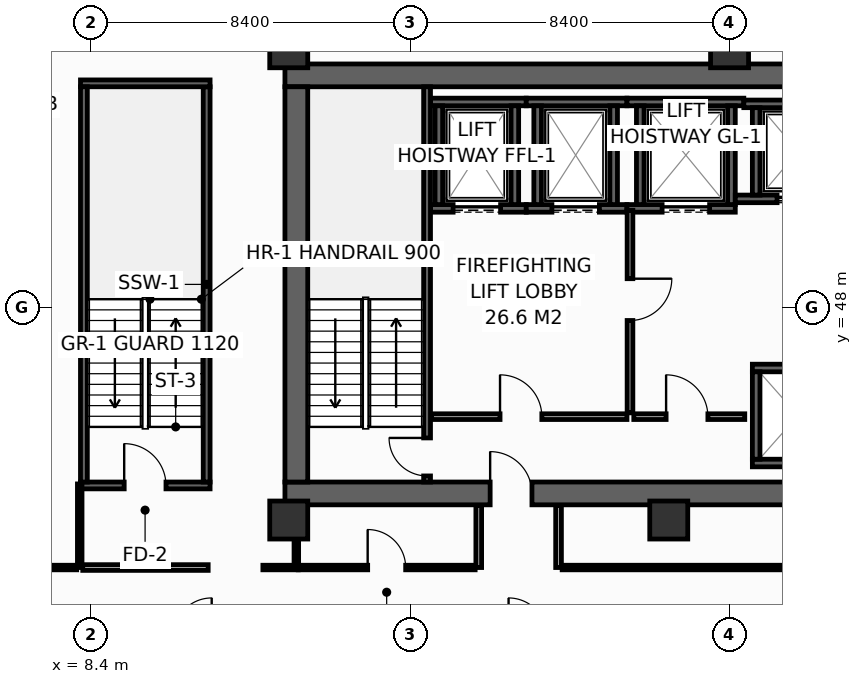
"""IFC4 building model, lengths in metres.
Left out: names, types, materials, properties, quantities, classifications, styles, units other than length and angle.
Written with IfcOpenShell. Run it as: python <this file> out.ifc"""

import sys

from ifc_helpers import new_model, si_unit, direction, frame, frame_2d, origin, origin_2d, place, context, subcontext, project, spatial, rectangle, hollow_rectangle, extrude, element, fill, save


model = new_model("IFC4")
c1 = context("Model", 3, precision=1e-05, world=origin(), true_north=direction((0.0, 1.0)))
c2 = subcontext(c1, "Body", "Model", "MODEL_VIEW")
j1 = project(units=[si_unit("LENGTHUNIT", "METRE"), si_unit("PLANEANGLEUNIT", "RADIAN")], contexts=[c1])
p1 = place(None, origin())
s1 = spatial("IfcSite", under=j1, at=p1, CompositionType="ELEMENT")
p2 = place(p1, origin())
s2 = spatial("IfcBuilding", under=s1, at=p2, CompositionType="ELEMENT")
p3 = place(p2, frame((0.0, 0.0, 101.6)))
s3 = spatial("IfcBuildingStorey", under=s2, at=p3, CompositionType="ELEMENT", Elevation=101.6)
p4 = place(p3, frame((13.5, 43.1, 0.0), z_axis=(0.0, 0.0, 1.0), x_axis=(1.0, 0.0, 0.0)))
e1 = element("IfcWall", 1, at=p4, inside=s3, PredefinedType="SHEAR", context=c2, shape_type="SweptSolid", body=[
    extrude(rectangle(XDim=32.9, YDim=0.6, at=frame_2d((16.45, 0.0))), origin(), (0.0, 0.0, 1.0), 4.15),
])
p5 = place(p4, frame((5.4, 0.0, 0.0)))
e2 = element("IfcOpeningElement", 2, at=p5, cuts=e1, PredefinedType="OPENING", context=c2, shape_type="SweptSolid", body=[
    extrude(rectangle(XDim=1.1, YDim=2.15, at=frame_2d((0.55, 1.075))), frame((0.0, 0.31, 0.0), z_axis=(0.0, -1.0, 0.0), x_axis=(1.0, 0.0, 0.0)), (0.0, 0.0, 1.0), 0.62),
])
p6 = place(p4, frame((25.6, 0.0, 0.0)))
e3 = element("IfcOpeningElement", 3, at=p6, cuts=e1, PredefinedType="OPENING", context=c2, shape_type="SweptSolid", body=[
    extrude(rectangle(XDim=1.1, YDim=2.15, at=frame_2d((0.55, 1.075))), frame((0.0, 0.31, 0.0), z_axis=(0.0, -1.0, 0.0), x_axis=(1.0, 0.0, 0.0)), (0.0, 0.0, 1.0), 0.62),
])
p7 = place(p3, frame((13.5, 54.1, 0.0), z_axis=(0.0, 0.0, 1.0), x_axis=(1.0, 0.0, 0.0)))
e4 = element("IfcWall", 4, at=p7, inside=s3, PredefinedType="SHEAR", context=c2, shape_type="SweptSolid", body=[
    extrude(rectangle(XDim=32.9, YDim=0.6, at=frame_2d((16.45, 0.0))), origin(), (0.0, 0.0, 1.0), 4.15),
])
p8 = place(p3, frame((13.8, 43.4, 0.0), z_axis=(0.0, 0.0, 1.0), x_axis=(0.0, 1.0, 0.0)))
e5 = element("IfcWall", 5, at=p8, inside=s3, PredefinedType="SHEAR", context=c2, shape_type="SweptSolid", body=[
    extrude(rectangle(XDim=10.4, YDim=0.6, at=frame_2d((5.2, 0.0))), origin(), (0.0, 0.0, 1.0), 4.15),
])
for number, where, z_axis, x_axis in (
    (6, (13.6, 54.8, 0.0), (0.0, 0.0, 1.0), (1.0, 0.0, 0.0)),
    (7, (25.2, 54.8, 0.0), (0.0, 0.0, 1.0), (1.0, 0.0, 0.0)),
    (8, (13.6, 42.4, 0.0), (0.0, 0.0, 1.0), (1.0, 0.0, 0.0)),
    (9, (23.6, 42.4, 0.0), (0.0, 0.0, 1.0), (1.0, 0.0, 0.0)),
):
    element("IfcColumn", number, at=place(p3, frame(where, z_axis=z_axis, x_axis=x_axis)), inside=s3, PredefinedType="COLUMN", context=c2, shape_type="SweptSolid", body=[
        extrude(hollow_rectangle(XDim=1.0, YDim=1.0, WallThickness=0.045, at=origin_2d()), origin(), (0.0, 0.0, 1.0), 4.4),
    ])
p9 = place(p3, frame((17.33, 50.6, 0.0), z_axis=(0.0, 0.0, 1.0), x_axis=(1.0, 0.0, 0.0)))
e10 = element("IfcWall", 10, at=p9, inside=s3, PredefinedType="SHEAR", context=c2, shape_type="SweptSolid", body=[
    extrude(rectangle(XDim=2.52, YDim=0.2, at=frame_2d((1.26, 0.0))), origin(), (0.0, 0.0, 1.0), 4.15),
])
p10 = place(p9, frame((0.595, 0.0, 0.0)))
e11 = element("IfcOpeningElement", 11, at=p10, cuts=e10, PredefinedType="OPENING", context=c2, shape_type="SweptSolid", body=[
    extrude(rectangle(XDim=1.25, YDim=2.3, at=frame_2d((0.625, 1.15))), frame((0.0, 0.11, 0.0), z_axis=(0.0, -1.0, 0.0), x_axis=(1.0, 0.0, 0.0)), (0.0, 0.0, 1.0), 0.22),
])
p11 = place(p3, frame((17.33, 53.4, 0.0), z_axis=(0.0, 0.0, 1.0), x_axis=(1.0, 0.0, 0.0)))
e12 = element("IfcWall", 12, at=p11, inside=s3, PredefinedType="SHEAR", context=c2, shape_type="SweptSolid", body=[
    extrude(rectangle(XDim=2.52, YDim=0.2, at=frame_2d((1.26, 0.0))), origin(), (0.0, 0.0, 1.0), 4.15),
])
for number, where, z_axis, x_axis in (
    (13, (17.55, 50.7, 0.0), (0.0, 0.0, 1.0), (0.0, 1.0, 0.0)),
    (14, (19.55, 50.7, 0.0), (0.0, 0.0, 1.0), (0.0, 1.0, 0.0)),
):
    element("IfcWall", number, at=place(p3, frame(where, z_axis=z_axis, x_axis=x_axis)), inside=s3, PredefinedType="SHEAR", context=c2, shape_type="SweptSolid", body=[
        extrude(rectangle(XDim=2.6, YDim=0.2, at=frame_2d((1.3, 0.0))), origin(), (0.0, 0.0, 1.0), 4.15),
    ])
p12 = place(p3, frame((19.85, 50.6, 0.0), z_axis=(0.0, 0.0, 1.0), x_axis=(1.0, 0.0, 0.0)))
e15 = element("IfcWall", 15, at=p12, inside=s3, PredefinedType="SHEAR", context=c2, shape_type="SweptSolid", body=[
    extrude(rectangle(XDim=2.65, YDim=0.2, at=frame_2d((1.325, 0.0))), origin(), (0.0, 0.0, 1.0), 4.15),
])
p13 = place(p12, frame((0.675, 0.0, 0.0)))
e16 = element("IfcOpeningElement", 16, at=p13, cuts=e15, PredefinedType="OPENING", context=c2, shape_type="SweptSolid", body=[
    extrude(rectangle(XDim=1.25, YDim=2.3, at=frame_2d((0.625, 1.15))), frame((0.0, 0.11, 0.0), z_axis=(0.0, -1.0, 0.0), x_axis=(1.0, 0.0, 0.0)), (0.0, 0.0, 1.0), 0.22),
])
p14 = place(p3, frame((19.85, 53.4, 0.0), z_axis=(0.0, 0.0, 1.0), x_axis=(1.0, 0.0, 0.0)))
e17 = element("IfcWall", 17, at=p14, inside=s3, PredefinedType="SHEAR", context=c2, shape_type="SweptSolid", body=[
    extrude(rectangle(XDim=2.65, YDim=0.2, at=frame_2d((1.325, 0.0))), origin(), (0.0, 0.0, 1.0), 4.15),
])
for number, where, z_axis, x_axis in (
    (18, (20.15, 50.7, 0.0), (0.0, 0.0, 1.0), (0.0, 1.0, 0.0)),
    (19, (22.15, 50.7, 0.0), (0.0, 0.0, 1.0), (0.0, 1.0, 0.0)),
):
    element("IfcWall", number, at=place(p3, frame(where, z_axis=z_axis, x_axis=x_axis)), inside=s3, PredefinedType="SHEAR", context=c2, shape_type="SweptSolid", body=[
        extrude(rectangle(XDim=2.6, YDim=0.2, at=frame_2d((1.3, 0.0))), origin(), (0.0, 0.0, 1.0), 4.15),
    ])
p15 = place(p3, frame((22.5, 50.6, 0.0), z_axis=(0.0, 0.0, 1.0), x_axis=(1.0, 0.0, 0.0)))
e20 = element("IfcWall", 20, at=p15, inside=s3, PredefinedType="SHEAR", context=c2, shape_type="SweptSolid", body=[
    extrude(rectangle(XDim=2.85, YDim=0.2, at=frame_2d((1.425, 0.0))), origin(), (0.0, 0.0, 1.0), 4.15),
])
p16 = place(p15, frame((0.925, 0.0, 0.0)))
e21 = element("IfcOpeningElement", 21, at=p16, cuts=e20, PredefinedType="OPENING", context=c2, shape_type="SweptSolid", body=[
    extrude(rectangle(XDim=1.25, YDim=2.3, at=frame_2d((0.625, 1.15))), frame((0.0, 0.11, 0.0), z_axis=(0.0, -1.0, 0.0), x_axis=(1.0, 0.0, 0.0)), (0.0, 0.0, 1.0), 0.22),
])
p17 = place(p3, frame((22.5, 53.4, 0.0), z_axis=(0.0, 0.0, 1.0), x_axis=(1.0, 0.0, 0.0)))
e22 = element("IfcWall", 22, at=p17, inside=s3, PredefinedType="SHEAR", context=c2, shape_type="SweptSolid", body=[
    extrude(rectangle(XDim=3.075, YDim=0.2, at=frame_2d((1.538, 0.0))), origin(), (0.0, 0.0, 1.0), 4.15),
])
for number, where, z_axis, x_axis in (
    (23, (22.85, 50.7, 0.0), (0.0, 0.0, 1.0), (0.0, 1.0, 0.0)),
    (24, (25.25, 50.7, 0.0), (0.0, 0.0, 1.0), (0.0, 1.0, 0.0)),
):
    element("IfcWall", number, at=place(p3, frame(where, z_axis=z_axis, x_axis=x_axis)), inside=s3, PredefinedType="SHEAR", context=c2, shape_type="SweptSolid", body=[
        extrude(rectangle(XDim=2.6, YDim=0.2, at=frame_2d((1.3, 0.0))), origin(), (0.0, 0.0, 1.0), 4.15),
    ])
p18 = place(p3, frame((25.35, 50.85, 0.0), z_axis=(0.0, 0.0, 1.0), x_axis=(1.0, 0.0, 0.0)))
e25 = element("IfcWall", 25, at=p18, inside=s3, PredefinedType="SHEAR", context=c2, shape_type="SweptSolid", body=[
    extrude(rectangle(XDim=3.025, YDim=0.2, at=frame_2d((1.512, 0.0))), origin(), (0.0, 0.0, 1.0), 4.15),
])
p19 = place(p18, frame((1.1, 0.0, 0.0)))
e26 = element("IfcOpeningElement", 26, at=p19, cuts=e25, PredefinedType="OPENING", context=c2, shape_type="SweptSolid", body=[
    extrude(rectangle(XDim=1.1, YDim=2.2, at=frame_2d((0.55, 1.1))), frame((0.0, 0.11, 0.0), z_axis=(0.0, -1.0, 0.0), x_axis=(1.0, 0.0, 0.0)), (0.0, 0.0, 1.0), 0.22),
])
p20 = place(p3, frame((25.575, 53.35, 0.0), z_axis=(0.0, 0.0, 1.0), x_axis=(1.0, 0.0, 0.0)))
e27 = element("IfcWall", 27, at=p20, inside=s3, PredefinedType="SHEAR", context=c2, shape_type="SweptSolid", body=[
    extrude(rectangle(XDim=2.8, YDim=0.2, at=frame_2d((1.4, 0.0))), origin(), (0.0, 0.0, 1.0), 4.15),
])
p21 = place(p3, frame((25.9, 50.95, 0.0), z_axis=(0.0, 0.0, 1.0), x_axis=(0.0, 1.0, 0.0)))
e28 = element("IfcWall", 28, at=p21, inside=s3, PredefinedType="SHEAR", context=c2, shape_type="SweptSolid", body=[
    extrude(rectangle(XDim=2.3, YDim=0.2, at=frame_2d((1.15, 0.0))), origin(), (0.0, 0.0, 1.0), 4.15),
])
for number, where, z_axis, x_axis in (
    (29, (25.8, 43.9, 0.0), (0.0, 0.0, 1.0), (1.0, 0.0, 0.0)),
    (30, (25.8, 46.4, 0.0), (0.0, 0.0, 1.0), (1.0, 0.0, 0.0)),
):
    element("IfcWall", number, at=place(p3, frame(where, z_axis=z_axis, x_axis=x_axis)), inside=s3, PredefinedType="SHEAR", context=c2, shape_type="SweptSolid", body=[
        extrude(rectangle(XDim=2.575, YDim=0.2, at=frame_2d((1.288, 0.0))), origin(), (0.0, 0.0, 1.0), 4.15),
    ])
p22 = place(p3, frame((25.9, 44.0, 0.0), z_axis=(0.0, 0.0, 1.0), x_axis=(0.0, 1.0, 0.0)))
e31 = element("IfcWall", 31, at=p22, inside=s3, PredefinedType="SHEAR", context=c2, shape_type="SweptSolid", body=[
    extrude(rectangle(XDim=2.3, YDim=0.2, at=frame_2d((1.15, 0.0))), origin(), (0.0, 0.0, 1.0), 4.15),
])
p23 = place(p3, frame((17.24, 43.4, 0.0), z_axis=(0.0, 0.0, 1.0), x_axis=(0.0, 1.0, 0.0)))
e32 = element("IfcWall", 32, at=p23, inside=s3, PredefinedType="SHEAR", context=c2, shape_type="SweptSolid", body=[
    extrude(rectangle(XDim=10.4, YDim=0.18, at=frame_2d((5.2, 0.0))), origin(), (0.0, 0.0, 1.0), 4.15),
])
p24 = place(p23, frame((0.16, 0.0, 0.0)))
e33 = element("IfcOpeningElement", 33, at=p24, cuts=e32, PredefinedType="OPENING", context=c2, shape_type="SweptSolid", body=[
    extrude(rectangle(XDim=1.0, YDim=2.15, at=frame_2d((0.5, 1.075))), frame((0.0, 0.1, 0.0), z_axis=(0.0, -1.0, 0.0), x_axis=(1.0, 0.0, 0.0)), (0.0, 0.0, 1.0), 0.2),
])
p25 = place(p3, frame((8.12, 43.31, 0.0), z_axis=(0.0, 0.0, 1.0), x_axis=(1.0, 0.0, 0.0)))
e34 = element("IfcWall", 34, at=p25, inside=s3, PredefinedType="SHEAR", context=c2, shape_type="SweptSolid", body=[
    extrude(rectangle(XDim=3.41, YDim=0.18, at=frame_2d((1.705, 0.0))), origin(), (0.0, 0.0, 1.0), 4.15),
])
p26 = place(p25, frame((1.15, 0.0, 0.0)))
e35 = element("IfcOpeningElement", 35, at=p26, cuts=e34, PredefinedType="OPENING", context=c2, shape_type="SweptSolid", body=[
    extrude(rectangle(XDim=1.1, YDim=2.15, at=frame_2d((0.55, 1.075))), frame((0.0, 0.1, 0.0), z_axis=(0.0, -1.0, 0.0), x_axis=(1.0, 0.0, 0.0)), (0.0, 0.0, 1.0), 0.2),
])
p27 = place(p3, frame((11.44, 43.4, 0.0), z_axis=(0.0, 0.0, 1.0), x_axis=(0.0, 1.0, 0.0)))
e36 = element("IfcWall", 36, at=p27, inside=s3, PredefinedType="SHEAR", context=c2, shape_type="SweptSolid", body=[
    extrude(rectangle(XDim=10.4, YDim=0.18, at=frame_2d((5.2, 0.0))), origin(), (0.0, 0.0, 1.0), 4.15),
])
p28 = place(p3, frame((11.53, 53.89, 0.0), z_axis=(0.0, 0.0, 1.0), x_axis=(-1.0, 0.0, 0.0)))
e37 = element("IfcWall", 37, at=p28, inside=s3, PredefinedType="SHEAR", context=c2, shape_type="SweptSolid", body=[
    extrude(rectangle(XDim=3.41, YDim=0.18, at=frame_2d((1.705, 0.0))), origin(), (0.0, 0.0, 1.0), 4.15),
])
p29 = place(p3, frame((8.21, 53.8, 0.0), z_axis=(0.0, 0.0, 1.0), x_axis=(0.0, -1.0, 0.0)))
e38 = element("IfcWall", 38, at=p29, inside=s3, PredefinedType="SHEAR", context=c2, shape_type="SweptSolid", body=[
    extrude(rectangle(XDim=10.4, YDim=0.18, at=frame_2d((5.2, 0.0))), origin(), (0.0, 0.0, 1.0), 4.15),
])
p30 = place(p3, frame((17.36, 45.12, 0.0), z_axis=(0.0, 0.0, 1.0), x_axis=(1.0, 0.0, 0.0)))
e39 = element("IfcWall", 39, at=p30, inside=s3, PredefinedType="PARTITIONING", context=c2, shape_type="SweptSolid", body=[
    extrude(rectangle(XDim=5.14, YDim=0.15, at=frame_2d((2.57, 0.0))), origin(), (0.0, 0.0, 1.0), 4.15),
])
p31 = place(p30, frame((1.8, 0.0, 0.0)))
e40 = element("IfcOpeningElement", 40, at=p31, cuts=e39, PredefinedType="OPENING", context=c2, shape_type="SweptSolid", body=[
    extrude(rectangle(XDim=1.1, YDim=2.15, at=frame_2d((0.55, 1.075))), frame((0.0, 0.085, 0.0), z_axis=(0.0, -1.0, 0.0), x_axis=(1.0, 0.0, 0.0)), (0.0, 0.0, 1.0), 0.17),
])
p32 = place(p3, frame((22.58, 50.55, 0.0), z_axis=(0.0, 0.0, 1.0), x_axis=(0.0, -1.0, 0.0)))
e41 = element("IfcWall", 41, at=p32, inside=s3, PredefinedType="PARTITIONING", context=c2, shape_type="SweptSolid", body=[
    extrude(rectangle(XDim=5.33, YDim=0.15, at=frame_2d((2.665, 0.0))), origin(), (0.0, 0.0, 1.0), 4.15),
])
p33 = place(p32, frame((1.8, 0.0, 0.0)))
e42 = element("IfcOpeningElement", 42, at=p33, cuts=e41, PredefinedType="OPENING", context=c2, shape_type="SweptSolid", body=[
    extrude(rectangle(XDim=1.1, YDim=2.15, at=frame_2d((0.55, 1.075))), frame((0.0, 0.085, 0.0), z_axis=(0.0, -1.0, 0.0), x_axis=(1.0, 0.0, 0.0)), (0.0, 0.0, 1.0), 0.17),
])
p34 = place(p3, frame((22.68, 45.12, 0.0), z_axis=(0.0, 0.0, 1.0), x_axis=(1.0, 0.0, 0.0)))
e43 = element("IfcWall", 43, at=p34, inside=s3, PredefinedType="PARTITIONING", context=c2, shape_type="SweptSolid", body=[
    extrude(rectangle(XDim=2.92, YDim=0.15, at=frame_2d((1.46, 0.0))), origin(), (0.0, 0.0, 1.0), 4.15),
])
p35 = place(p34, frame((0.85, 0.0, 0.0)))
e44 = element("IfcOpeningElement", 44, at=p35, cuts=e43, PredefinedType="OPENING", context=c2, shape_type="SweptSolid", body=[
    extrude(rectangle(XDim=1.1, YDim=2.15, at=frame_2d((0.55, 1.075))), frame((0.0, 0.085, 0.0), z_axis=(0.0, -1.0, 0.0), x_axis=(1.0, 0.0, 0.0)), (0.0, 0.0, 1.0), 0.17),
])
p36 = place(p3, frame((12.92, 41.15, 0.0), z_axis=(0.0, 0.0, 1.0), x_axis=(1.0, 0.0, 0.0)))
e45 = element("IfcWall", 45, at=p36, inside=s3, PredefinedType="PARTITIONING", context=c2, shape_type="SweptSolid", body=[
    extrude(rectangle(XDim=0.93, YDim=0.12, at=frame_2d((0.465, 0.0))), origin(), (0.0, 0.0, 1.0), 4.15),
])
p37 = place(p3, frame((13.8, 41.23, 0.0), z_axis=(0.0, 0.0, 1.0), x_axis=(0.0, 1.0, 0.0)))
e46 = element("IfcWall", 46, at=p37, inside=s3, PredefinedType="PARTITIONING", context=c2, shape_type="SweptSolid", body=[
    extrude(rectangle(XDim=1.55, YDim=0.12, at=frame_2d((0.775, 0.0))), origin(), (0.0, 0.0, 1.0), 4.15),
])
p38 = place(p3, frame((8.1, 41.15, 0.0), z_axis=(0.0, 0.0, 1.0), x_axis=(0.0, 1.0, 0.0)))
e47 = element("IfcWall", 47, at=p38, inside=s3, PredefinedType="PARTITIONING", context=c2, shape_type="SweptSolid", body=[
    extrude(rectangle(XDim=2.2, YDim=0.12, at=frame_2d((1.1, 0.0))), origin(), (0.0, 0.0, 1.0), 3.335),
])
p39 = place(p3, frame((8.18, 41.15, 0.0), z_axis=(0.0, 0.0, 1.0), x_axis=(1.0, 0.0, 0.0)))
e48 = element("IfcWall", 48, at=p39, inside=s3, PredefinedType="PARTITIONING", context=c2, shape_type="SweptSolid", body=[
    extrude(rectangle(XDim=3.3, YDim=0.15, at=frame_2d((1.65, 0.0))), origin(), (0.0, 0.0, 1.0), 4.15),
])
p40 = place(p3, frame((5.942, 41.15, 0.0), z_axis=(0.0, 0.0, 1.0), x_axis=(1.0, 0.0, 0.0)))
e49 = element("IfcWall", 49, at=p40, inside=s3, PredefinedType="PARTITIONING", context=c2, shape_type="SweptSolid", body=[
    extrude(rectangle(XDim=2.078, YDim=0.12, at=frame_2d((1.039, 0.0))), origin(), (0.0, 0.0, 1.0), 3.635),
])
for number, where, z_axis, x_axis in (
    (50, (18.6, 41.15, 0.0), (0.0, 0.0, 1.0), (0.0, 1.0, 0.0)),
    (51, (20.7, 41.15, 0.0), (0.0, 0.0, 1.0), (0.0, 1.0, 0.0)),
):
    element("IfcWall", number, at=place(p3, frame(where, z_axis=z_axis, x_axis=x_axis)), inside=s3, PredefinedType="PARTITIONING", context=c2, shape_type="SweptSolid", body=[
        extrude(rectangle(XDim=1.63, YDim=0.15, at=frame_2d((0.815, 0.0))), origin(), (0.0, 0.0, 1.0), 4.15),
    ])
p41 = place(p3, frame((13.85, 41.15, 0.0), z_axis=(0.0, 0.0, 1.0), x_axis=(1.0, 0.0, 0.0)))
e52 = element("IfcWall", 52, at=p41, inside=s3, PredefinedType="PARTITIONING", context=c2, shape_type="SweptSolid", body=[
    extrude(rectangle(XDim=4.655, YDim=0.12, at=frame_2d((2.327, 0.0))), origin(), (0.0, 0.0, 1.0), 4.15),
])
p42 = place(p41, frame((1.827, 0.0, 0.0)))
e53 = element("IfcOpeningElement", 53, at=p42, cuts=e52, PredefinedType="OPENING", context=c2, shape_type="SweptSolid", body=[
    extrude(rectangle(XDim=1.0, YDim=2.15, at=frame_2d((0.5, 1.075))), frame((0.0, 0.07, 0.0), z_axis=(0.0, -1.0, 0.0), x_axis=(1.0, 0.0, 0.0)), (0.0, 0.0, 1.0), 0.14),
])
p43 = place(p3, frame((20.795, 41.15, 0.0), z_axis=(0.0, 0.0, 1.0), x_axis=(1.0, 0.0, 0.0)))
e54 = element("IfcWall", 54, at=p43, inside=s3, PredefinedType="PARTITIONING", context=c2, shape_type="SweptSolid", body=[
    extrude(rectangle(XDim=17.91, YDim=0.12, at=frame_2d((8.955, 0.0))), origin(), (0.0, 0.0, 1.0), 3.335),
])
p44 = place(p43, frame((8.455, 0.0, 0.0)))
e55 = element("IfcOpeningElement", 55, at=p44, cuts=e54, PredefinedType="OPENING", context=c2, shape_type="SweptSolid", body=[
    extrude(rectangle(XDim=1.0, YDim=2.15, at=frame_2d((0.5, 1.075))), frame((0.0, 0.07, 0.0), z_axis=(0.0, -1.0, 0.0), x_axis=(1.0, 0.0, 0.0)), (0.0, 0.0, 1.0), 0.14),
])
p45 = place(p10, origin())
e56 = element("IfcDoor", 56, at=p45, inside=s3, OperationType="SLIDING_TO_LEFT", PredefinedType="DOOR", context=c2, shape_type="SweptSolid", body=[
    extrude(rectangle(XDim=1.25, YDim=2.3, at=frame_2d((0.625, 1.15))), frame((0.0, 0.025, 0.0), z_axis=(0.0, -1.0, 0.0), x_axis=(1.0, 0.0, 0.0)), (0.0, 0.0, 1.0), 0.05),
])
fill(e11, e56)
p46 = place(p13, origin())
e57 = element("IfcDoor", 57, at=p46, inside=s3, OperationType="SLIDING_TO_LEFT", PredefinedType="DOOR", context=c2, shape_type="SweptSolid", body=[
    extrude(rectangle(XDim=1.25, YDim=2.3, at=frame_2d((0.625, 1.15))), frame((0.0, 0.025, 0.0), z_axis=(0.0, -1.0, 0.0), x_axis=(1.0, 0.0, 0.0)), (0.0, 0.0, 1.0), 0.05),
])
fill(e16, e57)
p47 = place(p16, origin())
e58 = element("IfcDoor", 58, at=p47, inside=s3, OperationType="SLIDING_TO_LEFT", PredefinedType="DOOR", context=c2, shape_type="SweptSolid", body=[
    extrude(rectangle(XDim=1.25, YDim=2.3, at=frame_2d((0.625, 1.15))), frame((0.0, 0.025, 0.0), z_axis=(0.0, -1.0, 0.0), x_axis=(1.0, 0.0, 0.0)), (0.0, 0.0, 1.0), 0.05),
])
fill(e21, e58)
p48 = place(p19, origin())
e59 = element("IfcDoor", 59, at=p48, inside=s3, OperationType="SLIDING_TO_LEFT", PredefinedType="DOOR", context=c2, shape_type="SweptSolid", body=[
    extrude(rectangle(XDim=1.1, YDim=2.2, at=frame_2d((0.55, 1.1))), frame((0.0, 0.025, 0.0), z_axis=(0.0, -1.0, 0.0), x_axis=(1.0, 0.0, 0.0)), (0.0, 0.0, 1.0), 0.05),
])
fill(e26, e59)
p49 = place(p24, origin())
e60 = element("IfcDoor", 60, at=p49, inside=s3, OperationType="SINGLE_SWING_RIGHT", PredefinedType="DOOR", context=c2, shape_type="SweptSolid", body=[
    extrude(rectangle(XDim=1.0, YDim=2.15, at=frame_2d((0.5, 1.075))), frame((0.0, 0.025, 0.0), z_axis=(0.0, -1.0, 0.0), x_axis=(1.0, 0.0, 0.0)), (0.0, 0.0, 1.0), 0.05),
])
fill(e33, e60)
p50 = place(p26, origin())
e61 = element("IfcDoor", 61, at=p50, inside=s3, OperationType="SINGLE_SWING_LEFT", PredefinedType="DOOR", context=c2, shape_type="SweptSolid", body=[
    extrude(rectangle(XDim=1.1, YDim=2.15, at=frame_2d((0.55, 1.075))), frame((0.0, 0.025, 0.0), z_axis=(0.0, -1.0, 0.0), x_axis=(1.0, 0.0, 0.0)), (0.0, 0.0, 1.0), 0.05),
])
fill(e35, e61)
p51 = place(p31, origin())
e62 = element("IfcDoor", 62, at=p51, inside=s3, OperationType="SINGLE_SWING_LEFT", PredefinedType="DOOR", context=c2, shape_type="SweptSolid", body=[
    extrude(rectangle(XDim=1.1, YDim=2.15, at=frame_2d((0.55, 1.075))), frame((0.0, 0.025, 0.0), z_axis=(0.0, -1.0, 0.0), x_axis=(1.0, 0.0, 0.0)), (0.0, 0.0, 1.0), 0.05),
])
fill(e40, e62)
p52 = place(p33, origin())
e63 = element("IfcDoor", 63, at=p52, inside=s3, OperationType="SINGLE_SWING_LEFT", PredefinedType="DOOR", context=c2, shape_type="SweptSolid", body=[
    extrude(rectangle(XDim=1.1, YDim=2.15, at=frame_2d((0.55, 1.075))), frame((0.0, 0.025, 0.0), z_axis=(0.0, -1.0, 0.0), x_axis=(1.0, 0.0, 0.0)), (0.0, 0.0, 1.0), 0.05),
])
fill(e42, e63)
p53 = place(p35, origin())
e64 = element("IfcDoor", 64, at=p53, inside=s3, OperationType="SINGLE_SWING_LEFT", PredefinedType="DOOR", context=c2, shape_type="SweptSolid", body=[
    extrude(rectangle(XDim=1.1, YDim=2.15, at=frame_2d((0.55, 1.075))), frame((0.0, 0.025, 0.0), z_axis=(0.0, -1.0, 0.0), x_axis=(1.0, 0.0, 0.0)), (0.0, 0.0, 1.0), 0.05),
])
fill(e44, e64)
p54 = place(p5, origin())
e65 = element("IfcDoor", 65, at=p54, inside=s3, OperationType="SINGLE_SWING_LEFT", PredefinedType="DOOR", context=c2, shape_type="SweptSolid", body=[
    extrude(rectangle(XDim=1.1, YDim=2.15, at=frame_2d((0.55, 1.075))), frame((0.0, 0.025, 0.0), z_axis=(0.0, -1.0, 0.0), x_axis=(1.0, 0.0, 0.0)), (0.0, 0.0, 1.0), 0.05),
])
fill(e2, e65)
p55 = place(p42, origin())
e66 = element("IfcDoor", 66, at=p55, inside=s3, OperationType="SINGLE_SWING_LEFT", PredefinedType="DOOR", context=c2, shape_type="SweptSolid", body=[
    extrude(rectangle(XDim=1.0, YDim=2.15, at=frame_2d((0.5, 1.075))), frame((0.0, 0.025, 0.0), z_axis=(0.0, -1.0, 0.0), x_axis=(1.0, 0.0, 0.0)), (0.0, 0.0, 1.0), 0.05),
])
fill(e53, e66)
save(model, sys.argv[1])
